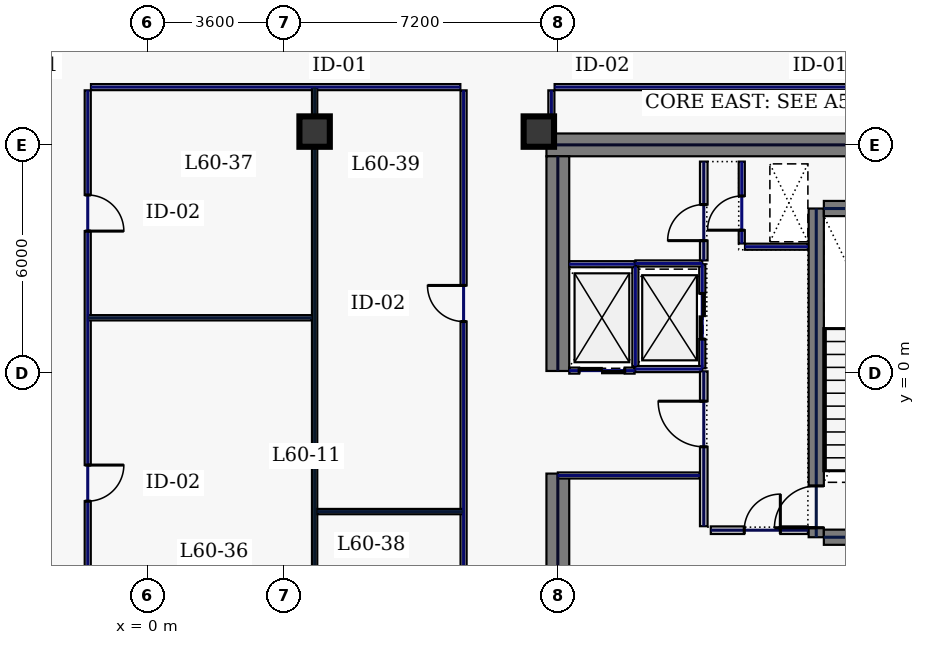
"""IFC4 building model, lengths in metres.
Left out: names, types, materials, properties, quantities, classifications, styles, units other than length and angle.
Written with IfcOpenShell. Run it as: python <this file> out.ifc"""

import sys

from ifc_helpers import new_model, si_unit, direction, frame, frame_2d, origin, origin_2d, place, context, subcontext, project, spatial, rectangle, hollow_rectangle, extrude, element, fill, save


model = new_model("IFC4")
c1 = context("Model", 3, precision=1e-05, world=origin(), true_north=direction((0.0, 1.0)))
c2 = subcontext(c1, "Body", "Model", "MODEL_VIEW")
j1 = project(units=[si_unit("LENGTHUNIT", "METRE"), si_unit("PLANEANGLEUNIT", "RADIAN")], contexts=[c1])
p1 = place(None, origin())
s1 = spatial("IfcSite", under=j1, at=p1, CompositionType="ELEMENT")
p2 = place(p1, origin())
s2 = spatial("IfcBuilding", under=s1, at=p2, CompositionType="ELEMENT")
p3 = place(p2, frame((0.0, 0.0, 259.0)))
s3 = spatial("IfcBuildingStorey", under=s2, at=p3, CompositionType="ELEMENT", Elevation=259.0)
p4 = place(p3, frame((10.5, 6.0, 0.0), z_axis=(0.0, 0.0, 1.0), x_axis=(1.0, 0.0, 0.0)))
e1 = element("IfcWall", 1, at=p4, inside=s3, PredefinedType="SHEAR", context=c2, shape_type="SweptSolid", body=[
    extrude(rectangle(XDim=11.5, YDim=0.6, at=frame_2d((5.75, 0.0))), origin(), (0.0, 0.0, 1.0), 3.74),
])
p5 = place(p3, frame((10.8, -5.7, 0.0), z_axis=(0.0, 0.0, 1.0), x_axis=(0.0, 1.0, 0.0)))
e2 = element("IfcWall", 2, at=p5, inside=s3, PredefinedType="SHEAR", context=c2, shape_type="SweptSolid", body=[
    extrude(rectangle(XDim=3.05, YDim=0.6, at=frame_2d((1.525, 0.0))), origin(), (0.0, 0.0, 1.0), 3.74),
])
p6 = place(p3, frame((10.8, 0.05, 0.0), z_axis=(0.0, 0.0, 1.0), x_axis=(0.0, 1.0, 0.0)))
e3 = element("IfcWall", 3, at=p6, inside=s3, PredefinedType="SHEAR", context=c2, shape_type="SweptSolid", body=[
    extrude(rectangle(XDim=5.65, YDim=0.6, at=frame_2d((2.825, 0.0))), origin(), (0.0, 0.0, 1.0), 3.74),
])
p7 = place(p3, frame((17.6, -4.325, 0.0), z_axis=(0.0, 0.0, 1.0), x_axis=(0.0, 1.0, 0.0)))
e4 = element("IfcWall", 4, at=p7, inside=s3, PredefinedType="SHEAR", context=c2, shape_type="SweptSolid", body=[
    extrude(rectangle(XDim=8.65, YDim=0.4, at=frame_2d((4.325, 0.0))), origin(), (0.0, 0.0, 1.0), 3.74),
])
p8 = place(p7, frame((0.25, 0.0, 0.0)))
e5 = element("IfcOpeningElement", 5, at=p8, cuts=e4, PredefinedType="OPENING", context=c2, shape_type="SweptSolid", body=[
    extrude(rectangle(XDim=1.1, YDim=2.2, at=frame_2d((0.55, 1.1))), frame((0.0, 0.21, 0.0), z_axis=(0.0, -1.0, 0.0), x_axis=(1.0, 0.0, 0.0)), (0.0, 0.0, 1.0), 0.42),
])
for number, where, z_axis, x_axis in (
    (6, (17.8, -4.325, 0.0), (0.0, 0.0, 1.0), (1.0, 0.0, 0.0)),
    (7, (17.8, 4.325, 0.0), (0.0, 0.0, 1.0), (1.0, 0.0, 0.0)),
):
    element("IfcWall", number, at=place(p3, frame(where, z_axis=z_axis, x_axis=x_axis)), inside=s3, PredefinedType="SHEAR", context=c2, shape_type="SweptSolid", body=[
        extrude(rectangle(XDim=3.4, YDim=0.4, at=frame_2d((1.7, 0.0))), origin(), (0.0, 0.0, 1.0), 3.74),
    ])
for number, where, z_axis, x_axis in (
    (8, (10.3, 6.35, 0.0), (0.0, 0.0, 1.0), (1.0, 0.0, 0.0)),
    (9, (4.4, 6.35, 0.0), (0.0, 0.0, 1.0), (1.0, 0.0, 0.0)),
):
    element("IfcColumn", number, at=place(p3, frame(where, z_axis=z_axis, x_axis=x_axis)), inside=s3, PredefinedType="COLUMN", context=c2, shape_type="SweptSolid", body=[
        extrude(hollow_rectangle(XDim=0.8, YDim=0.8, WallThickness=0.036, at=origin_2d()), origin(), (0.0, 0.0, 1.0), 3.74),
    ])
p9 = place(p3, frame((14.6, 0.12, 0.0), z_axis=(0.0, 0.0, 1.0), x_axis=(0.0, 1.0, 0.0)))
e10 = element("IfcWall", 10, at=p9, inside=s3, PredefinedType="PARTITIONING", context=c2, shape_type="SweptSolid", body=[
    extrude(rectangle(XDim=2.74, YDim=0.16, at=frame_2d((1.37, 0.0))), origin(), (0.0, 0.0, 1.0), 3.74),
])
p10 = place(p9, frame((0.77, 0.0, 0.0)))
e11 = element("IfcOpeningElement", 11, at=p10, cuts=e10, PredefinedType="OPENING", context=c2, shape_type="SweptSolid", body=[
    extrude(rectangle(XDim=1.2, YDim=2.2, at=frame_2d((0.6, 1.1))), frame((0.0, 0.09, 0.0), z_axis=(0.0, -1.0, 0.0), x_axis=(1.0, 0.0, 0.0)), (0.0, 0.0, 1.0), 0.18),
])
for number, where, z_axis, x_axis in (
    (12, (12.84, 0.1, 0.0), (0.0, 0.0, 1.0), (1.0, 0.0, 0.0)),
    (13, (12.84, 2.88, 0.0), (0.0, 0.0, 1.0), (1.0, 0.0, 0.0)),
):
    element("IfcWall", number, at=place(p3, frame(where, z_axis=z_axis, x_axis=x_axis)), inside=s3, PredefinedType="PARTITIONING", context=c2, shape_type="SweptSolid", body=[
        extrude(rectangle(XDim=1.76, YDim=0.16, at=frame_2d((0.88, 0.0))), origin(), (0.0, 0.0, 1.0), 3.74),
    ])
p11 = place(p3, frame((12.84, 0.18, 0.0), z_axis=(0.0, 0.0, 1.0), x_axis=(0.0, 1.0, 0.0)))
e14 = element("IfcWall", 14, at=p11, inside=s3, PredefinedType="PARTITIONING", context=c2, shape_type="SweptSolid", body=[
    extrude(rectangle(XDim=2.62, YDim=0.16, at=frame_2d((1.31, 0.0))), origin(), (0.0, 0.0, 1.0), 3.74),
])
p12 = place(p3, frame((11.1, 0.06, 0.0), z_axis=(0.0, 0.0, 1.0), x_axis=(1.0, 0.0, 0.0)))
e15 = element("IfcWall", 15, at=p12, inside=s3, PredefinedType="PARTITIONING", context=c2, shape_type="SweptSolid", body=[
    extrude(rectangle(XDim=1.72, YDim=0.16, at=frame_2d((0.86, 0.0))), origin(), (0.0, 0.0, 1.0), 3.74),
])
p13 = place(p12, frame((0.26, 0.0, 0.0)))
e16 = element("IfcOpeningElement", 16, at=p13, cuts=e15, PredefinedType="OPENING", context=c2, shape_type="SweptSolid", body=[
    extrude(rectangle(XDim=1.2, YDim=2.2, at=frame_2d((0.6, 1.1))), frame((0.0, 0.09, 0.0), z_axis=(0.0, -1.0, 0.0), x_axis=(1.0, 0.0, 0.0)), (0.0, 0.0, 1.0), 0.18),
])
p14 = place(p3, frame((11.1, 2.86, 0.0), z_axis=(0.0, 0.0, 1.0), x_axis=(1.0, 0.0, 0.0)))
e17 = element("IfcWall", 17, at=p14, inside=s3, PredefinedType="PARTITIONING", context=c2, shape_type="SweptSolid", body=[
    extrude(rectangle(XDim=1.72, YDim=0.16, at=frame_2d((0.86, 0.0))), origin(), (0.0, 0.0, 1.0), 3.74),
])
p15 = place(p3, frame((15.64, 3.405, 0.0), z_axis=(0.0, 0.0, 1.0), x_axis=(0.0, 1.0, 0.0)))
e18 = element("IfcWall", 18, at=p15, inside=s3, PredefinedType="PARTITIONING", context=c2, shape_type="SweptSolid", body=[
    extrude(rectangle(XDim=2.155, YDim=0.16, at=frame_2d((1.078, 0.0))), origin(), (0.0, 0.0, 1.0), 3.74),
])
p16 = place(p15, frame((0.35, 0.0, 0.0)))
e19 = element("IfcOpeningElement", 19, at=p16, cuts=e18, PredefinedType="OPENING", context=c2, shape_type="SweptSolid", body=[
    extrude(rectangle(XDim=0.9, YDim=2.2, at=frame_2d((0.45, 1.1))), frame((0.0, 0.09, 0.0), z_axis=(0.0, -1.0, 0.0), x_axis=(1.0, 0.0, 0.0)), (0.0, 0.0, 1.0), 0.18),
])
p17 = place(p3, frame((15.725, 3.32, 0.0), z_axis=(0.0, 0.0, 1.0), x_axis=(1.0, 0.0, 0.0)))
e20 = element("IfcWall", 20, at=p17, inside=s3, PredefinedType="PARTITIONING", context=c2, shape_type="SweptSolid", body=[
    extrude(rectangle(XDim=1.655, YDim=0.16, at=frame_2d((0.827, 0.0))), origin(), (0.0, 0.0, 1.0), 3.74),
])
p18 = place(p3, frame((14.825, -4.14, 0.0), z_axis=(0.0, 0.0, 1.0), x_axis=(1.0, 0.0, 0.0)))
e21 = element("IfcWall", 21, at=p18, inside=s3, PredefinedType="SOLIDWALL", context=c2, shape_type="SweptSolid", body=[
    extrude(rectangle(XDim=2.555, YDim=0.2, at=frame_2d((1.277, 0.0))), origin(), (0.0, 0.0, 1.0), 3.74),
])
p19 = place(p18, frame((0.88, 0.0, 0.0)))
e22 = element("IfcOpeningElement", 22, at=p19, cuts=e21, PredefinedType="OPENING", context=c2, shape_type="SweptSolid", body=[
    extrude(rectangle(XDim=0.95, YDim=2.2, at=frame_2d((0.475, 1.1))), frame((0.0, 0.11, 0.0), z_axis=(0.0, -1.0, 0.0), x_axis=(1.0, 0.0, 0.0)), (0.0, 0.0, 1.0), 0.22),
])
p20 = place(p3, frame((10.8, -2.7, 0.0), z_axis=(0.0, 0.0, 1.0), x_axis=(1.0, 0.0, 0.0)))
e23 = element("IfcWall", 23, at=p20, inside=s3, PredefinedType="PARTITIONING", context=c2, shape_type="SweptSolid", body=[
    extrude(rectangle(XDim=3.735, YDim=0.16, at=frame_2d((1.867, 0.0))), origin(), (0.0, 0.0, 1.0), 3.74),
])
p21 = place(p3, frame((14.64, 2.96, 0.0), z_axis=(0.0, 0.0, 1.0), x_axis=(0.0, 1.0, 0.0)))
e24 = element("IfcWall", 24, at=p21, inside=s3, PredefinedType="SOLIDWALL", context=c2, shape_type="SweptSolid", body=[
    extrude(rectangle(XDim=2.6, YDim=0.2, at=frame_2d((1.3, 0.0))), origin(), (0.0, 0.0, 1.0), 3.74),
])
p22 = place(p21, frame((0.52, 0.0, 0.0)))
e25 = element("IfcOpeningElement", 25, at=p22, cuts=e24, PredefinedType="OPENING", context=c2, shape_type="SweptSolid", body=[
    extrude(rectangle(XDim=0.95, YDim=2.2, at=frame_2d((0.475, 1.1))), frame((0.0, 0.11, 0.0), z_axis=(0.0, -1.0, 0.0), x_axis=(1.0, 0.0, 0.0)), (0.0, 0.0, 1.0), 0.22),
])
p23 = place(p3, frame((14.64, -4.035, 0.0), z_axis=(0.0, 0.0, 1.0), x_axis=(0.0, 1.0, 0.0)))
e26 = element("IfcWall", 26, at=p23, inside=s3, PredefinedType="SOLIDWALL", context=c2, shape_type="SweptSolid", body=[
    extrude(rectangle(XDim=4.075, YDim=0.2, at=frame_2d((2.038, 0.0))), origin(), (0.0, 0.0, 1.0), 3.74),
])
p24 = place(p23, frame((2.09, 0.0, 0.0)))
e27 = element("IfcOpeningElement", 27, at=p24, cuts=e26, PredefinedType="OPENING", context=c2, shape_type="SweptSolid", body=[
    extrude(rectangle(XDim=1.2, YDim=2.2, at=frame_2d((0.6, 1.1))), frame((0.0, 0.11, 0.0), z_axis=(0.0, -1.0, 0.0), x_axis=(1.0, 0.0, 0.0)), (0.0, 0.0, 1.0), 0.22),
])
p25 = place(p3, frame((22.585, 7.52, 0.0), z_axis=(0.0, 0.0, 1.0), x_axis=(-1.0, 0.0, 0.0)))
e28 = element("IfcWall", 28, at=p25, inside=s3, PredefinedType="PARTITIONING", context=c2, shape_type="SweptSolid", body=[
    extrude(rectangle(XDim=11.87, YDim=0.16, at=frame_2d((5.935, 0.0))), origin(), (0.0, 0.0, 1.0), 3.74),
])
p26 = place(p3, frame((10.63, 7.435, 0.0), z_axis=(0.0, 0.0, 1.0), x_axis=(0.0, -1.0, 0.0)))
e29 = element("IfcWall", 29, at=p26, inside=s3, PredefinedType="PARTITIONING", context=c2, shape_type="SweptSolid", body=[
    extrude(rectangle(XDim=1.015, YDim=0.16, at=frame_2d((0.508, 0.0))), origin(), (0.0, 0.0, 1.0), 3.74),
])
p27 = place(p3, frame((8.235, 7.52, 0.0), z_axis=(0.0, 0.0, 1.0), x_axis=(-1.0, 0.0, 0.0)))
e30 = element("IfcWall", 30, at=p27, inside=s3, PredefinedType="PARTITIONING", context=c2, shape_type="SweptSolid", body=[
    extrude(rectangle(XDim=9.72, YDim=0.16, at=frame_2d((4.86, 0.0))), origin(), (0.0, 0.0, 1.0), 3.74),
])
p28 = place(p3, frame((-1.57, 7.435, 0.0), z_axis=(0.0, 0.0, 1.0), x_axis=(0.0, -1.0, 0.0)))
e31 = element("IfcWall", 31, at=p28, inside=s3, PredefinedType="PARTITIONING", context=c2, shape_type="SweptSolid", body=[
    extrude(rectangle(XDim=14.82, YDim=0.16, at=frame_2d((7.41, 0.0))), origin(), (0.0, 0.0, 1.0), 3.74),
])
p29 = place(p28, frame((9.861, 0.0, 0.0)))
e32 = element("IfcOpeningElement", 32, at=p29, cuts=e31, PredefinedType="OPENING", context=c2, shape_type="SweptSolid", body=[
    extrude(rectangle(XDim=0.95, YDim=2.2, at=frame_2d((0.475, 1.1))), frame((0.0, 0.09, 0.0), z_axis=(0.0, -1.0, 0.0), x_axis=(1.0, 0.0, 0.0)), (0.0, 0.0, 1.0), 0.18),
])
p30 = place(p28, frame((2.754, 0.0, 0.0)))
e33 = element("IfcOpeningElement", 33, at=p30, cuts=e31, PredefinedType="OPENING", context=c2, shape_type="SweptSolid", body=[
    extrude(rectangle(XDim=0.95, YDim=2.2, at=frame_2d((0.475, 1.1))), frame((0.0, 0.09, 0.0), z_axis=(0.0, -1.0, 0.0), x_axis=(1.0, 0.0, 0.0)), (0.0, 0.0, 1.0), 0.18),
])
p31 = place(p3, frame((8.32, -7.385, 0.0), z_axis=(0.0, 0.0, 1.0), x_axis=(0.0, 1.0, 0.0)))
e34 = element("IfcWall", 34, at=p31, inside=s3, PredefinedType="PARTITIONING", context=c2, shape_type="SweptSolid", body=[
    extrude(rectangle(XDim=14.82, YDim=0.16, at=frame_2d((7.41, 0.0))), origin(), (0.0, 0.0, 1.0), 3.74),
])
p32 = place(p31, frame((8.736, 0.0, 0.0)))
e35 = element("IfcOpeningElement", 35, at=p32, cuts=e34, PredefinedType="OPENING", context=c2, shape_type="SweptSolid", body=[
    extrude(rectangle(XDim=0.95, YDim=2.2, at=frame_2d((0.475, 1.1))), frame((0.0, 0.09, 0.0), z_axis=(0.0, -1.0, 0.0), x_axis=(1.0, 0.0, 0.0)), (0.0, 0.0, 1.0), 0.18),
])
p33 = place(p3, frame((4.4, -7.465, 0.0), z_axis=(0.0, 0.0, 1.0), x_axis=(0.0, 1.0, 0.0)))
e36 = element("IfcWall", 36, at=p33, inside=s3, PredefinedType="PARTITIONING", context=c2, shape_type="SweptSolid", body=[
    extrude(rectangle(XDim=14.98, YDim=0.14, at=frame_2d((7.49, 0.0))), origin(), (0.0, 0.0, 1.0), 3.035),
])
p34 = place(p3, frame((-1.565, 1.45, 0.0), z_axis=(0.0, 0.0, 1.0), x_axis=(1.0, 0.0, 0.0)))
e37 = element("IfcWall", 37, at=p34, inside=s3, PredefinedType="PARTITIONING", context=c2, shape_type="SweptSolid", body=[
    extrude(rectangle(XDim=5.89, YDim=0.14, at=frame_2d((2.945, 0.0))), origin(), (0.0, 0.0, 1.0), 3.74),
])
p35 = place(p3, frame((4.475, -3.65, 0.0), z_axis=(0.0, 0.0, 1.0), x_axis=(1.0, 0.0, 0.0)))
e38 = element("IfcWall", 38, at=p35, inside=s3, PredefinedType="PARTITIONING", context=c2, shape_type="SweptSolid", body=[
    extrude(rectangle(XDim=3.84, YDim=0.14, at=frame_2d((1.92, 0.0))), origin(), (0.0, 0.0, 1.0), 3.74),
])
p36 = place(p8, origin())
e39 = element("IfcDoor", 39, at=p36, inside=s3, OperationType="SINGLE_SWING_LEFT", PredefinedType="DOOR", context=c2, shape_type="SweptSolid", body=[
    extrude(rectangle(XDim=1.1, YDim=2.2, at=frame_2d((0.55, 1.1))), frame((0.0, 0.025, 0.0), z_axis=(0.0, -1.0, 0.0), x_axis=(1.0, 0.0, 0.0)), (0.0, 0.0, 1.0), 0.05),
])
fill(e5, e39)
p37 = place(p10, origin())
e40 = element("IfcDoor", 40, at=p37, inside=s3, OperationType="SLIDING_TO_LEFT", PredefinedType="DOOR", context=c2, shape_type="SweptSolid", body=[
    extrude(rectangle(XDim=1.2, YDim=2.2, at=frame_2d((0.6, 1.1))), frame((0.0, 0.025, 0.0), z_axis=(0.0, -1.0, 0.0), x_axis=(1.0, 0.0, 0.0)), (0.0, 0.0, 1.0), 0.05),
])
fill(e11, e40)
p38 = place(p13, origin())
e41 = element("IfcDoor", 41, at=p38, inside=s3, OperationType="SLIDING_TO_LEFT", PredefinedType="DOOR", context=c2, shape_type="SweptSolid", body=[
    extrude(rectangle(XDim=1.2, YDim=2.2, at=frame_2d((0.6, 1.1))), frame((0.0, 0.025, 0.0), z_axis=(0.0, -1.0, 0.0), x_axis=(1.0, 0.0, 0.0)), (0.0, 0.0, 1.0), 0.05),
])
fill(e16, e41)
p39 = place(p16, origin())
e42 = element("IfcDoor", 42, at=p39, inside=s3, OperationType="SINGLE_SWING_LEFT", PredefinedType="DOOR", context=c2, shape_type="SweptSolid", body=[
    extrude(rectangle(XDim=0.9, YDim=2.2, at=frame_2d((0.45, 1.1))), frame((0.0, 0.025, 0.0), z_axis=(0.0, -1.0, 0.0), x_axis=(1.0, 0.0, 0.0)), (0.0, 0.0, 1.0), 0.05),
])
fill(e19, e42)
p40 = place(p19, origin())
e43 = element("IfcDoor", 43, at=p40, inside=s3, OperationType="SINGLE_SWING_RIGHT", PredefinedType="DOOR", context=c2, shape_type="SweptSolid", body=[
    extrude(rectangle(XDim=0.95, YDim=2.2, at=frame_2d((0.475, 1.1))), frame((0.0, 0.025, 0.0), z_axis=(0.0, -1.0, 0.0), x_axis=(1.0, 0.0, 0.0)), (0.0, 0.0, 1.0), 0.05),
])
fill(e22, e43)
p41 = place(p22, origin())
e44 = element("IfcDoor", 44, at=p41, inside=s3, OperationType="SINGLE_SWING_LEFT", PredefinedType="DOOR", context=c2, shape_type="SweptSolid", body=[
    extrude(rectangle(XDim=0.95, YDim=2.2, at=frame_2d((0.475, 1.1))), frame((0.0, 0.025, 0.0), z_axis=(0.0, -1.0, 0.0), x_axis=(1.0, 0.0, 0.0)), (0.0, 0.0, 1.0), 0.05),
])
fill(e25, e44)
p42 = place(p24, origin())
e45 = element("IfcDoor", 45, at=p42, inside=s3, OperationType="SINGLE_SWING_RIGHT", PredefinedType="DOOR", context=c2, shape_type="SweptSolid", body=[
    extrude(rectangle(XDim=1.2, YDim=2.2, at=frame_2d((0.6, 1.1))), frame((0.0, 0.025, 0.0), z_axis=(0.0, -1.0, 0.0), x_axis=(1.0, 0.0, 0.0)), (0.0, 0.0, 1.0), 0.05),
])
fill(e27, e45)
p43 = place(p29, origin())
e46 = element("IfcDoor", 46, at=p43, inside=s3, OperationType="SINGLE_SWING_LEFT", PredefinedType="DOOR", context=c2, shape_type="SweptSolid", body=[
    extrude(rectangle(XDim=0.95, YDim=2.2, at=frame_2d((0.475, 1.1))), frame((0.0, 0.025, 0.0), z_axis=(0.0, -1.0, 0.0), x_axis=(1.0, 0.0, 0.0)), (0.0, 0.0, 1.0), 0.05),
])
fill(e32, e46)
p44 = place(p30, origin())
e47 = element("IfcDoor", 47, at=p44, inside=s3, OperationType="SINGLE_SWING_RIGHT", PredefinedType="DOOR", context=c2, shape_type="SweptSolid", body=[
    extrude(rectangle(XDim=0.95, YDim=2.2, at=frame_2d((0.475, 1.1))), frame((0.0, 0.025, 0.0), z_axis=(0.0, -1.0, 0.0), x_axis=(1.0, 0.0, 0.0)), (0.0, 0.0, 1.0), 0.05),
])
fill(e33, e47)
p45 = place(p32, origin())
e48 = element("IfcDoor", 48, at=p45, inside=s3, OperationType="SINGLE_SWING_RIGHT", PredefinedType="DOOR", context=c2, shape_type="SweptSolid", body=[
    extrude(rectangle(XDim=0.95, YDim=2.2, at=frame_2d((0.475, 1.1))), frame((0.0, 0.025, 0.0), z_axis=(0.0, -1.0, 0.0), x_axis=(1.0, 0.0, 0.0)), (0.0, 0.0, 1.0), 0.05),
])
fill(e35, e48)
save(model, sys.argv[1])
